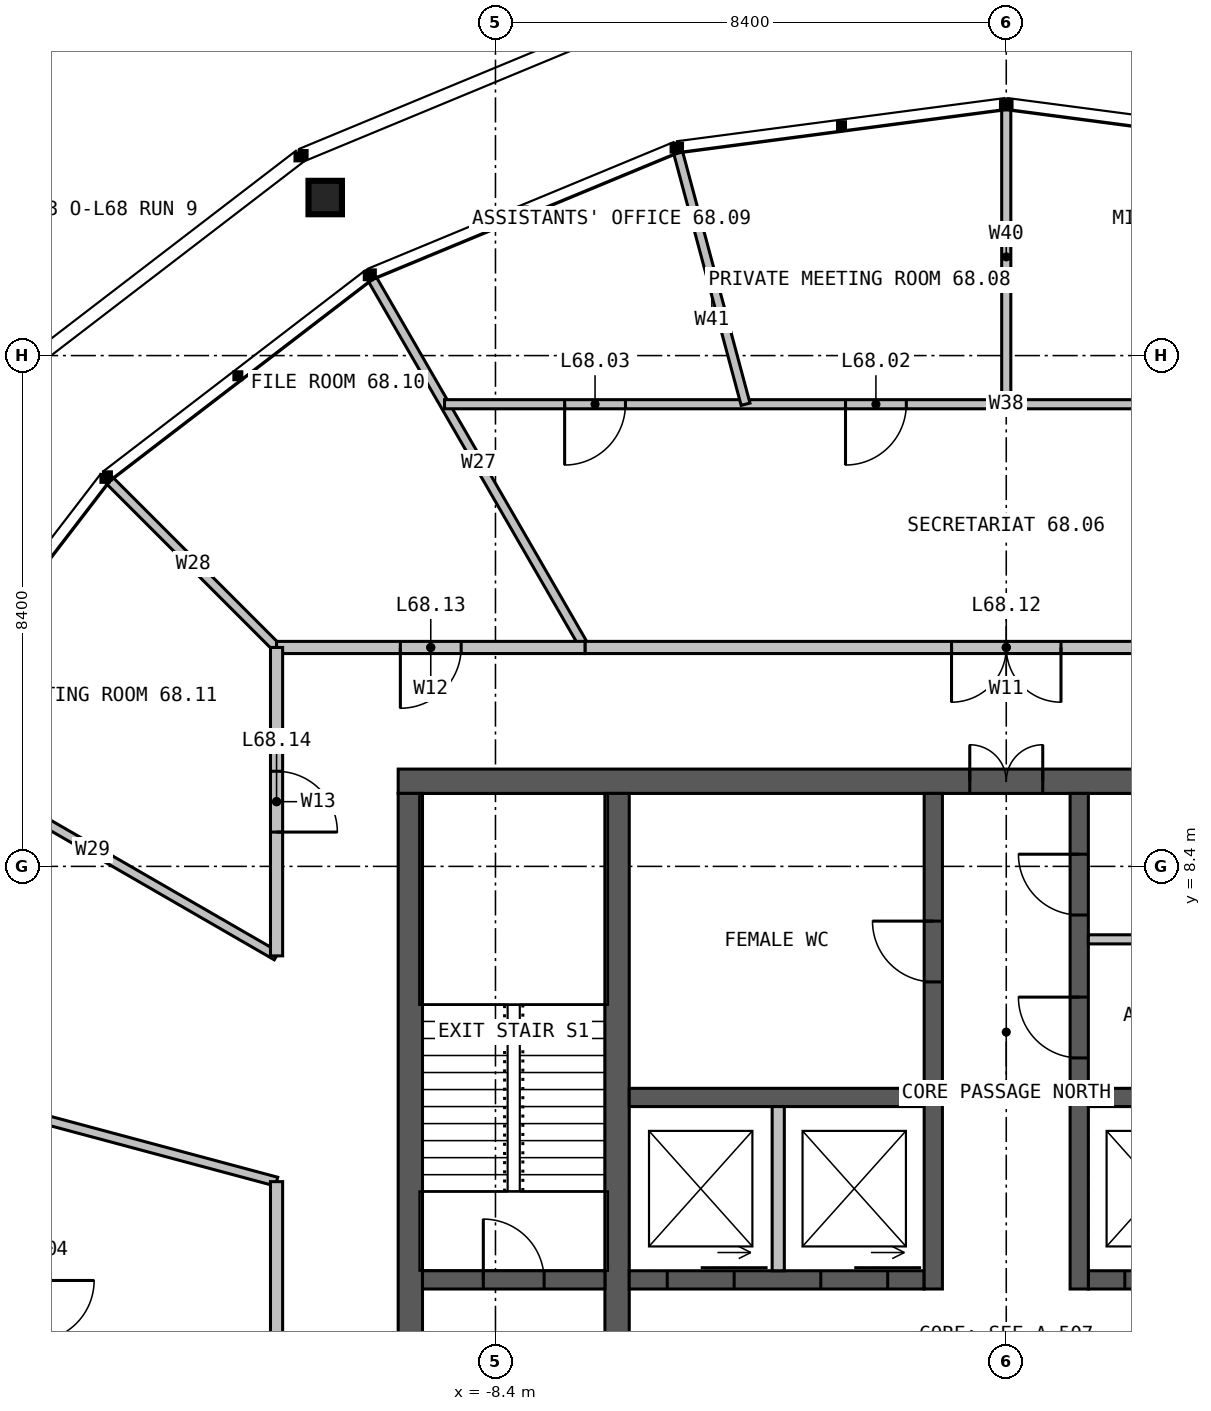
"""IFC4 building model, lengths in metres.
Left out: names, types, materials, properties, quantities, classifications, styles, units other than length and angle.
Written with IfcOpenShell. Run it as: python <this file> out.ifc"""

import sys

from ifc_helpers import new_model, si_unit, direction, frame, frame_2d, origin, origin_2d, place, context, subcontext, project, spatial, rectangle, hollow_rectangle, extrude, element, fill, save


model = new_model("IFC4")
c1 = context("Model", 3, precision=1e-05, world=origin(), true_north=direction((0.0, 1.0)))
c2 = subcontext(c1, "Body", "Model", "MODEL_VIEW")
j1 = project(units=[si_unit("LENGTHUNIT", "METRE"), si_unit("PLANEANGLEUNIT", "RADIAN")], contexts=[c1])
p1 = place(None, origin())
s1 = spatial("IfcSite", under=j1, at=p1, CompositionType="ELEMENT")
p2 = place(p1, origin())
s2 = spatial("IfcBuilding", under=s1, at=p2, CompositionType="ELEMENT")
p3 = place(p2, frame((0.0, 0.0, 280.0)))
s3 = spatial("IfcBuildingStorey", under=s2, at=p3, CompositionType="ELEMENT", Elevation=280.0)
p4 = place(p3, frame((-10.0, 9.8, 0.0), z_axis=(0.0, 0.0, 1.0), x_axis=(1.0, 0.0, 0.0)))
e1 = element("IfcWall", 1, at=p4, inside=s3, PredefinedType="SOLIDWALL", context=c2, shape_type="SweptSolid", body=[
    extrude(rectangle(XDim=20.0, YDim=0.4, at=frame_2d((10.0, 0.0))), origin(), (0.0, 0.0, 1.0), 4.0),
])
p5 = place(p4, frame((9.4, 0.0, 0.0)))
e2 = element("IfcOpeningElement", 2, at=p5, cuts=e1, PredefinedType="OPENING", context=c2, shape_type="SweptSolid", body=[
    extrude(rectangle(XDim=1.2, YDim=2.2, at=frame_2d((0.6, 1.1))), frame((0.0, 0.21, 0.0), z_axis=(0.0, -1.0, 0.0), x_axis=(1.0, 0.0, 0.0)), (0.0, 0.0, 1.0), 0.42),
])
p6 = place(p3, frame((-9.8, 9.6, 0.0), z_axis=(0.0, 0.0, 1.0), x_axis=(0.0, -1.0, 0.0)))
e3 = element("IfcWall", 3, at=p6, inside=s3, PredefinedType="SOLIDWALL", context=c2, shape_type="SweptSolid", body=[
    extrude(rectangle(XDim=19.2, YDim=0.4, at=frame_2d((9.6, 0.0))), origin(), (0.0, 0.0, 1.0), 4.0),
])
p7 = place(p3, frame((-6.4, -9.6, 0.0), z_axis=(0.0, 0.0, 1.0), x_axis=(0.0, 1.0, 0.0)))
e4 = element("IfcWall", 4, at=p7, inside=s3, PredefinedType="SOLIDWALL", context=c2, shape_type="SweptSolid", body=[
    extrude(rectangle(XDim=19.2, YDim=0.4, at=frame_2d((9.6, 0.0))), origin(), (0.0, 0.0, 1.0), 4.0),
])
p8 = place(p7, frame((9.1, 0.0, 0.0)))
e5 = element("IfcOpeningElement", 5, at=p8, cuts=e4, PredefinedType="OPENING", context=c2, shape_type="SweptSolid", body=[
    extrude(rectangle(XDim=1.0, YDim=2.2, at=frame_2d((0.5, 1.1))), frame((0.0, 0.21, 0.0), z_axis=(0.0, -1.0, 0.0), x_axis=(1.0, 0.0, 0.0)), (0.0, 0.0, 1.0), 0.42),
])
p9 = place(p3, frame((-6.2, 1.6, 0.0), z_axis=(0.0, 0.0, 1.0), x_axis=(1.0, 0.0, 0.0)))
e6 = element("IfcWall", 6, at=p9, inside=s3, PredefinedType="SOLIDWALL", context=c2, shape_type="SweptSolid", body=[
    extrude(rectangle(XDim=4.85, YDim=0.3, at=frame_2d((2.425, 0.0))), origin(), (0.0, 0.0, 1.0), 4.0),
])
p10 = place(p9, frame((0.625, 0.0, 0.0)))
e7 = element("IfcOpeningElement", 7, at=p10, cuts=e6, PredefinedType="OPENING", context=c2, shape_type="SweptSolid", body=[
    extrude(rectangle(XDim=1.1, YDim=2.2, at=frame_2d((0.55, 1.1))), frame((0.0, 0.16, 0.0), z_axis=(0.0, -1.0, 0.0), x_axis=(1.0, 0.0, 0.0)), (0.0, 0.0, 1.0), 0.32),
])
p11 = place(p9, frame((3.15, 0.0, 0.0)))
e8 = element("IfcOpeningElement", 8, at=p11, cuts=e6, PredefinedType="OPENING", context=c2, shape_type="SweptSolid", body=[
    extrude(rectangle(XDim=1.1, YDim=2.2, at=frame_2d((0.55, 1.1))), frame((0.0, 0.16, 0.0), z_axis=(0.0, -1.0, 0.0), x_axis=(1.0, 0.0, 0.0)), (0.0, 0.0, 1.0), 0.32),
])
p12 = place(p3, frame((1.35, 1.6, 0.0), z_axis=(0.0, 0.0, 1.0), x_axis=(1.0, 0.0, 0.0)))
e9 = element("IfcWall", 9, at=p12, inside=s3, PredefinedType="SOLIDWALL", context=c2, shape_type="SweptSolid", body=[
    extrude(rectangle(XDim=4.85, YDim=0.3, at=frame_2d((2.425, 0.0))), origin(), (0.0, 0.0, 1.0), 4.0),
])
p13 = place(p12, frame((0.6, 0.0, 0.0)))
e10 = element("IfcOpeningElement", 10, at=p13, cuts=e9, PredefinedType="OPENING", context=c2, shape_type="SweptSolid", body=[
    extrude(rectangle(XDim=1.1, YDim=2.2, at=frame_2d((0.55, 1.1))), frame((0.0, 0.16, 0.0), z_axis=(0.0, -1.0, 0.0), x_axis=(1.0, 0.0, 0.0)), (0.0, 0.0, 1.0), 0.32),
])
p14 = place(p12, frame((3.125, 0.0, 0.0)))
e11 = element("IfcOpeningElement", 11, at=p14, cuts=e9, PredefinedType="OPENING", context=c2, shape_type="SweptSolid", body=[
    extrude(rectangle(XDim=1.1, YDim=2.2, at=frame_2d((0.55, 1.1))), frame((0.0, 0.16, 0.0), z_axis=(0.0, -1.0, 0.0), x_axis=(1.0, 0.0, 0.0)), (0.0, 0.0, 1.0), 0.32),
])
for number, where, z_axis, x_axis in (
    (12, (-6.2, 4.6, 0.0), (0.0, 0.0, 1.0), (1.0, 0.0, 0.0)),
    (13, (1.35, 4.6, 0.0), (0.0, 0.0, 1.0), (1.0, 0.0, 0.0)),
):
    element("IfcWall", number, at=place(p3, frame(where, z_axis=z_axis, x_axis=x_axis)), inside=s3, PredefinedType="SOLIDWALL", context=c2, shape_type="SweptSolid", body=[
        extrude(rectangle(XDim=4.85, YDim=0.3, at=frame_2d((2.425, 0.0))), origin(), (0.0, 0.0, 1.0), 4.0),
    ])
p15 = place(p3, frame((-1.2, 1.45, 0.0), z_axis=(0.0, 0.0, 1.0), x_axis=(0.0, 1.0, 0.0)))
e14 = element("IfcWall", 14, at=p15, inside=s3, PredefinedType="SOLIDWALL", context=c2, shape_type="SweptSolid", body=[
    extrude(rectangle(XDim=8.15, YDim=0.3, at=frame_2d((4.075, 0.0))), origin(), (0.0, 0.0, 1.0), 4.0),
])
p16 = place(p15, frame((5.05, 0.0, 0.0)))
e15 = element("IfcOpeningElement", 15, at=p16, cuts=e14, PredefinedType="OPENING", context=c2, shape_type="SweptSolid", body=[
    extrude(rectangle(XDim=1.0, YDim=2.2, at=frame_2d((0.5, 1.1))), frame((0.0, 0.16, 0.0), z_axis=(0.0, -1.0, 0.0), x_axis=(1.0, 0.0, 0.0)), (0.0, 0.0, 1.0), 0.32),
])
p17 = place(p3, frame((1.2, 1.45, 0.0), z_axis=(0.0, 0.0, 1.0), x_axis=(0.0, 1.0, 0.0)))
e16 = element("IfcWall", 16, at=p17, inside=s3, PredefinedType="SOLIDWALL", context=c2, shape_type="SweptSolid", body=[
    extrude(rectangle(XDim=8.15, YDim=0.3, at=frame_2d((4.075, 0.0))), origin(), (0.0, 0.0, 1.0), 4.0),
])
p18 = place(p17, frame((3.8, 0.0, 0.0)))
e17 = element("IfcOpeningElement", 17, at=p18, cuts=e16, PredefinedType="OPENING", context=c2, shape_type="SweptSolid", body=[
    extrude(rectangle(XDim=1.0, YDim=2.2, at=frame_2d((0.5, 1.1))), frame((0.0, 0.16, 0.0), z_axis=(0.0, -1.0, 0.0), x_axis=(1.0, 0.0, 0.0)), (0.0, 0.0, 1.0), 0.32),
])
p19 = place(p17, frame((6.15, 0.0, 0.0)))
e18 = element("IfcOpeningElement", 18, at=p19, cuts=e16, PredefinedType="OPENING", context=c2, shape_type="SweptSolid", body=[
    extrude(rectangle(XDim=1.0, YDim=2.2, at=frame_2d((0.5, 1.1))), frame((0.0, 0.16, 0.0), z_axis=(0.0, -1.0, 0.0), x_axis=(1.0, 0.0, 0.0)), (0.0, 0.0, 1.0), 0.32),
])
p20 = place(p3, frame((-9.6, 1.6, 0.0), z_axis=(0.0, 0.0, 1.0), x_axis=(1.0, 0.0, 0.0)))
e19 = element("IfcWall", 19, at=p20, inside=s3, PredefinedType="SOLIDWALL", context=c2, shape_type="SweptSolid", body=[
    extrude(rectangle(XDim=3.0, YDim=0.3, at=frame_2d((1.5, 0.0))), origin(), (0.0, 0.0, 1.0), 4.0),
])
p21 = place(p20, frame((1.0, 0.0, 0.0)))
e20 = element("IfcOpeningElement", 20, at=p21, cuts=e19, PredefinedType="OPENING", context=c2, shape_type="SweptSolid", body=[
    extrude(rectangle(XDim=1.0, YDim=2.2, at=frame_2d((0.5, 1.1))), frame((0.0, 0.16, 0.0), z_axis=(0.0, -1.0, 0.0), x_axis=(1.0, 0.0, 0.0)), (0.0, 0.0, 1.0), 0.32),
])
p22 = place(p3, frame((-11.2, 19.399, -0.71), z_axis=(0.0, 0.0, 1.0), x_axis=(1.0, 0.0, 0.0)))
e21 = element("IfcColumn", 21, at=p22, inside=s3, PredefinedType="COLUMN", context=c2, shape_type="SweptSolid", body=[
    extrude(hollow_rectangle(XDim=0.55, YDim=0.55, WallThickness=0.04, at=origin_2d()), origin(), (0.0, 0.0, 1.0), 4.0),
])
p23 = place(p3, frame((-3.75, 1.75, 0.0), z_axis=(0.0, 0.0, 1.0), x_axis=(0.0, 1.0, 0.0)))
e22 = element("IfcWall", 22, at=p23, inside=s3, PredefinedType="SOLIDWALL", context=c2, shape_type="SweptSolid", body=[
    extrude(rectangle(XDim=2.7, YDim=0.2, at=frame_2d((1.35, 0.0))), origin(), (0.0, 0.0, 1.0), 3.75),
])
p24 = place(p3, frame((1.35, 7.2, 0.0), z_axis=(0.0, 0.0, 1.0), x_axis=(1.0, 0.0, 0.0)))
e23 = element("IfcWall", 23, at=p24, inside=s3, PredefinedType="PARTITIONING", context=c2, shape_type="SweptSolid", body=[
    extrude(rectangle(XDim=4.85, YDim=0.15, at=frame_2d((2.425, 0.0))), origin(), (0.0, 0.0, 1.0), 3.75),
])
p25 = place(p24, frame((3.45, 0.0, 0.0)))
e24 = element("IfcOpeningElement", 24, at=p25, cuts=e23, PredefinedType="OPENING", context=c2, shape_type="SweptSolid", body=[
    extrude(rectangle(XDim=0.9, YDim=2.2, at=frame_2d((0.45, 1.1))), frame((0.0, 0.085, 0.0), z_axis=(0.0, -1.0, 0.0), x_axis=(1.0, 0.0, 0.0)), (0.0, 0.0, 1.0), 0.17),
])
p26 = place(p3, frame((-6.928, 12.0, 0.0), z_axis=(0.0, 0.0, 1.0), x_axis=(-0.49998952364, 0.866031452229, 0.0)))
e25 = element("IfcWall", 25, at=p26, inside=s3, PredefinedType="PARTITIONING", context=c2, shape_type="SweptSolid", body=[
    extrude(rectangle(XDim=6.99, YDim=0.15, at=frame_2d((3.495, 0.0))), origin(), (0.0, 0.0, 1.0), 2.79),
])
p27 = place(p3, frame((-12.0, 12.0, 0.0), z_axis=(0.0, 0.0, 1.0), x_axis=(-0.707106781187, 0.707106781187, 0.0)))
e26 = element("IfcWall", 26, at=p27, inside=s3, PredefinedType="PARTITIONING", context=c2, shape_type="SweptSolid", body=[
    extrude(rectangle(XDim=3.876, YDim=0.15, at=frame_2d((1.938, 0.0))), origin(), (0.0, 0.0, 1.0), 2.7),
])
p28 = place(p3, frame((-12.0, 6.928, 0.0), z_axis=(0.0, 0.0, 1.0), x_axis=(-0.866031452229, 0.49998952364, 0.0)))
e27 = element("IfcWall", 27, at=p28, inside=s3, PredefinedType="PARTITIONING", context=c2, shape_type="SweptSolid", body=[
    extrude(rectangle(XDim=6.99, YDim=0.15, at=frame_2d((3.495, 0.0))), origin(), (0.0, 0.0, 1.0), 2.7),
])
p29 = place(p3, frame((-12.0, 3.215, 0.0), z_axis=(0.0, 0.0, 1.0), x_axis=(-0.96592152797, 0.258835086115, 0.0)))
e28 = element("IfcWall", 28, at=p29, inside=s3, PredefinedType="PARTITIONING", context=c2, shape_type="SweptSolid", body=[
    extrude(rectangle(XDim=8.423, YDim=0.15, at=frame_2d((4.211, 0.0))), origin(), (0.0, 0.0, 1.0), 2.7),
])
p30 = place(p3, frame((9.238, 16.0, 0.0), z_axis=(0.0, 0.0, 1.0), x_axis=(-1.0, 0.0, 0.0)))
e29 = element("IfcWall", 29, at=p30, inside=s3, PredefinedType="PARTITIONING", context=c2, shape_type="SweptSolid", body=[
    extrude(rectangle(XDim=18.475, YDim=0.15, at=frame_2d((9.238, 0.0))), origin(), (0.0, 0.0, 1.0), 2.79),
])
p31 = place(p30, frame((3.719, 0.0, 0.0)))
e30 = element("IfcOpeningElement", 30, at=p31, cuts=e29, PredefinedType="OPENING", context=c2, shape_type="SweptSolid", body=[
    extrude(rectangle(XDim=1.8, YDim=2.2, at=frame_2d((0.9, 1.1))), frame((0.0, 0.085, 0.0), z_axis=(0.0, -1.0, 0.0), x_axis=(1.0, 0.0, 0.0)), (0.0, 0.0, 1.0), 0.17),
])
p32 = place(p30, frame((10.881, 0.0, 0.0)))
e31 = element("IfcOpeningElement", 31, at=p32, cuts=e29, PredefinedType="OPENING", context=c2, shape_type="SweptSolid", body=[
    extrude(rectangle(XDim=1.0, YDim=2.2, at=frame_2d((0.5, 1.1))), frame((0.0, 0.085, 0.0), z_axis=(0.0, -1.0, 0.0), x_axis=(1.0, 0.0, 0.0)), (0.0, 0.0, 1.0), 0.17),
])
p33 = place(p30, frame((15.5, 0.0, 0.0)))
e32 = element("IfcOpeningElement", 32, at=p33, cuts=e29, PredefinedType="OPENING", context=c2, shape_type="SweptSolid", body=[
    extrude(rectangle(XDim=1.0, YDim=2.2, at=frame_2d((0.5, 1.1))), frame((0.0, 0.085, 0.0), z_axis=(0.0, -1.0, 0.0), x_axis=(1.0, 0.0, 0.0)), (0.0, 0.0, 1.0), 0.17),
])
p34 = place(p3, frame((0.0, 16.0, 0.0), z_axis=(0.0, 0.0, 1.0), x_axis=(0.0, 1.0, 0.0)))
e33 = element("IfcWall", 33, at=p34, inside=s3, PredefinedType="PARTITIONING", context=c2, shape_type="SweptSolid", body=[
    extrude(rectangle(XDim=4.846, YDim=0.15, at=frame_2d((2.423, 0.0))), origin(), (0.0, 0.0, 1.0), 2.79),
])
p35 = place(p3, frame((-4.287, 16.0, 0.0), z_axis=(0.0, 0.0, 1.0), x_axis=(-0.258854832266, 0.965916236437, 0.0)))
e34 = element("IfcWall", 34, at=p35, inside=s3, PredefinedType="PARTITIONING", context=c2, shape_type="SweptSolid", body=[
    extrude(rectangle(XDim=4.282, YDim=0.15, at=frame_2d((2.141, 0.0))), origin(), (0.0, 0.0, 1.0), 2.7),
])
p36 = place(p3, frame((6.928, 12.0, 0.0), z_axis=(0.0, 0.0, 1.0), x_axis=(-1.0, 0.0, 0.0)))
e35 = element("IfcWall", 35, at=p36, inside=s3, PredefinedType="PARTITIONING", context=c2, shape_type="SweptSolid", body=[
    extrude(rectangle(XDim=13.856, YDim=0.2, at=frame_2d((6.928, 0.0))), origin(), (0.0, 0.0, 1.0), 3.7),
])
p37 = place(p36, frame((6.028, 0.0, 0.0)))
e36 = element("IfcOpeningElement", 36, at=p37, cuts=e35, PredefinedType="OPENING", context=c2, shape_type="SweptSolid", body=[
    extrude(rectangle(XDim=1.8, YDim=2.2, at=frame_2d((0.9, 1.1))), frame((0.0, 0.11, 0.0), z_axis=(0.0, -1.0, 0.0), x_axis=(1.0, 0.0, 0.0)), (0.0, 0.0, 1.0), 0.22),
])
p38 = place(p3, frame((-6.928, 12.0, 0.0), z_axis=(0.0, 0.0, 1.0), x_axis=(-1.0, 0.0, 0.0)))
e37 = element("IfcWall", 37, at=p38, inside=s3, PredefinedType="PARTITIONING", context=c2, shape_type="SweptSolid", body=[
    extrude(rectangle(XDim=5.072, YDim=0.2, at=frame_2d((2.536, 0.0))), origin(), (0.0, 0.0, 1.0), 3.7),
])
p39 = place(p38, frame((2.036, 0.0, 0.0)))
e38 = element("IfcOpeningElement", 38, at=p39, cuts=e37, PredefinedType="OPENING", context=c2, shape_type="SweptSolid", body=[
    extrude(rectangle(XDim=1.0, YDim=2.2, at=frame_2d((0.5, 1.1))), frame((0.0, 0.11, 0.0), z_axis=(0.0, -1.0, 0.0), x_axis=(1.0, 0.0, 0.0)), (0.0, 0.0, 1.0), 0.22),
])
p40 = place(p3, frame((-12.0, 12.0, 0.0), z_axis=(0.0, 0.0, 1.0), x_axis=(0.0, -1.0, 0.0)))
e39 = element("IfcWall", 39, at=p40, inside=s3, PredefinedType="PARTITIONING", context=c2, shape_type="SweptSolid", body=[
    extrude(rectangle(XDim=5.072, YDim=0.2, at=frame_2d((2.536, 0.0))), origin(), (0.0, 0.0, 1.0), 3.7),
])
p41 = place(p40, frame((2.036, 0.0, 0.0)))
e40 = element("IfcOpeningElement", 40, at=p41, cuts=e39, PredefinedType="OPENING", context=c2, shape_type="SweptSolid", body=[
    extrude(rectangle(XDim=1.0, YDim=2.2, at=frame_2d((0.5, 1.1))), frame((0.0, 0.11, 0.0), z_axis=(0.0, -1.0, 0.0), x_axis=(1.0, 0.0, 0.0)), (0.0, 0.0, 1.0), 0.22),
])
p42 = place(p3, frame((-12.0, 3.215, 0.0), z_axis=(0.0, 0.0, 1.0), x_axis=(0.0, -1.0, 0.0)))
e41 = element("IfcWall", 41, at=p42, inside=s3, PredefinedType="PARTITIONING", context=c2, shape_type="SweptSolid", body=[
    extrude(rectangle(XDim=10.144, YDim=0.2, at=frame_2d((5.072, 0.0))), origin(), (0.0, 0.0, 1.0), 3.7),
])
p43 = place(p42, frame((4.172, 0.0, 0.0)))
e42 = element("IfcOpeningElement", 42, at=p43, cuts=e41, PredefinedType="OPENING", context=c2, shape_type="SweptSolid", body=[
    extrude(rectangle(XDim=1.8, YDim=2.2, at=frame_2d((0.9, 1.1))), frame((0.0, 0.11, 0.0), z_axis=(0.0, -1.0, 0.0), x_axis=(1.0, 0.0, 0.0)), (0.0, 0.0, 1.0), 0.22),
])
p44 = place(p5, origin())
e43 = element("IfcDoor", 43, at=p44, inside=s3, OperationType="DOUBLE_DOOR_SINGLE_SWING", PredefinedType="DOOR", context=c2, shape_type="SweptSolid", body=[
    extrude(rectangle(XDim=1.2, YDim=2.2, at=frame_2d((0.6, 1.1))), frame((0.0, 0.025, 0.0), z_axis=(0.0, -1.0, 0.0), x_axis=(1.0, 0.0, 0.0)), (0.0, 0.0, 1.0), 0.05),
])
fill(e2, e43)
p45 = place(p21, origin())
e44 = element("IfcDoor", 44, at=p45, inside=s3, OperationType="SINGLE_SWING_LEFT", PredefinedType="DOOR", context=c2, shape_type="SweptSolid", body=[
    extrude(rectangle(XDim=1.0, YDim=2.2, at=frame_2d((0.5, 1.1))), frame((0.0, 0.025, 0.0), z_axis=(0.0, -1.0, 0.0), x_axis=(1.0, 0.0, 0.0)), (0.0, 0.0, 1.0), 0.05),
])
fill(e20, e44)
p46 = place(p16, origin())
e45 = element("IfcDoor", 45, at=p46, inside=s3, OperationType="SINGLE_SWING_RIGHT", PredefinedType="DOOR", context=c2, shape_type="SweptSolid", body=[
    extrude(rectangle(XDim=1.0, YDim=2.2, at=frame_2d((0.5, 1.1))), frame((0.0, 0.025, 0.0), z_axis=(0.0, -1.0, 0.0), x_axis=(1.0, 0.0, 0.0)), (0.0, 0.0, 1.0), 0.05),
])
fill(e15, e45)
p47 = place(p18, origin())
e46 = element("IfcDoor", 46, at=p47, inside=s3, OperationType="SINGLE_SWING_RIGHT", PredefinedType="DOOR", context=c2, shape_type="SweptSolid", body=[
    extrude(rectangle(XDim=1.0, YDim=2.2, at=frame_2d((0.5, 1.1))), frame((0.0, 0.025, 0.0), z_axis=(0.0, -1.0, 0.0), x_axis=(1.0, 0.0, 0.0)), (0.0, 0.0, 1.0), 0.05),
])
fill(e17, e46)
p48 = place(p19, origin())
e47 = element("IfcDoor", 47, at=p48, inside=s3, OperationType="SINGLE_SWING_RIGHT", PredefinedType="DOOR", context=c2, shape_type="SweptSolid", body=[
    extrude(rectangle(XDim=1.0, YDim=2.2, at=frame_2d((0.5, 1.1))), frame((0.0, 0.025, 0.0), z_axis=(0.0, -1.0, 0.0), x_axis=(1.0, 0.0, 0.0)), (0.0, 0.0, 1.0), 0.05),
])
fill(e18, e47)
p49 = place(p10, origin())
e48 = element("IfcDoor", 48, at=p49, inside=s3, OperationType="SLIDING_TO_LEFT", PredefinedType="DOOR", context=c2, shape_type="SweptSolid", body=[
    extrude(rectangle(XDim=1.1, YDim=2.2, at=frame_2d((0.55, 1.1))), frame((0.0, 0.025, 0.0), z_axis=(0.0, -1.0, 0.0), x_axis=(1.0, 0.0, 0.0)), (0.0, 0.0, 1.0), 0.05),
])
fill(e7, e48)
p50 = place(p11, origin())
e49 = element("IfcDoor", 49, at=p50, inside=s3, OperationType="SLIDING_TO_LEFT", PredefinedType="DOOR", context=c2, shape_type="SweptSolid", body=[
    extrude(rectangle(XDim=1.1, YDim=2.2, at=frame_2d((0.55, 1.1))), frame((0.0, 0.025, 0.0), z_axis=(0.0, -1.0, 0.0), x_axis=(1.0, 0.0, 0.0)), (0.0, 0.0, 1.0), 0.05),
])
fill(e8, e49)
p51 = place(p13, origin())
e50 = element("IfcDoor", 50, at=p51, inside=s3, OperationType="SLIDING_TO_LEFT", PredefinedType="DOOR", context=c2, shape_type="SweptSolid", body=[
    extrude(rectangle(XDim=1.1, YDim=2.2, at=frame_2d((0.55, 1.1))), frame((0.0, 0.025, 0.0), z_axis=(0.0, -1.0, 0.0), x_axis=(1.0, 0.0, 0.0)), (0.0, 0.0, 1.0), 0.05),
])
fill(e10, e50)
p52 = place(p32, origin())
e51 = element("IfcDoor", 51, at=p52, inside=s3, OperationType="SINGLE_SWING_RIGHT", PredefinedType="DOOR", context=c2, shape_type="SweptSolid", body=[
    extrude(rectangle(XDim=1.0, YDim=2.2, at=frame_2d((0.5, 1.1))), frame((0.0, 0.025, 0.0), z_axis=(0.0, -1.0, 0.0), x_axis=(1.0, 0.0, 0.0)), (0.0, 0.0, 1.0), 0.05),
])
fill(e31, e51)
p53 = place(p33, origin())
e52 = element("IfcDoor", 52, at=p53, inside=s3, OperationType="SINGLE_SWING_RIGHT", PredefinedType="DOOR", context=c2, shape_type="SweptSolid", body=[
    extrude(rectangle(XDim=1.0, YDim=2.2, at=frame_2d((0.5, 1.1))), frame((0.0, 0.025, 0.0), z_axis=(0.0, -1.0, 0.0), x_axis=(1.0, 0.0, 0.0)), (0.0, 0.0, 1.0), 0.05),
])
fill(e32, e52)
p54 = place(p37, origin())
e53 = element("IfcDoor", 53, at=p54, inside=s3, OperationType="DOUBLE_DOOR_SINGLE_SWING", PredefinedType="DOOR", context=c2, shape_type="SweptSolid", body=[
    extrude(rectangle(XDim=1.8, YDim=2.2, at=frame_2d((0.9, 1.1))), frame((0.0, 0.025, 0.0), z_axis=(0.0, -1.0, 0.0), x_axis=(1.0, 0.0, 0.0)), (0.0, 0.0, 1.0), 0.05),
])
fill(e36, e53)
p55 = place(p39, origin())
e54 = element("IfcDoor", 54, at=p55, inside=s3, OperationType="SINGLE_SWING_RIGHT", PredefinedType="DOOR", context=c2, shape_type="SweptSolid", body=[
    extrude(rectangle(XDim=1.0, YDim=2.2, at=frame_2d((0.5, 1.1))), frame((0.0, 0.025, 0.0), z_axis=(0.0, -1.0, 0.0), x_axis=(1.0, 0.0, 0.0)), (0.0, 0.0, 1.0), 0.05),
])
fill(e38, e54)
p56 = place(p41, origin())
e55 = element("IfcDoor", 55, at=p56, inside=s3, OperationType="SINGLE_SWING_RIGHT", PredefinedType="DOOR", context=c2, shape_type="SweptSolid", body=[
    extrude(rectangle(XDim=1.0, YDim=2.2, at=frame_2d((0.5, 1.1))), frame((0.0, 0.025, 0.0), z_axis=(0.0, -1.0, 0.0), x_axis=(1.0, 0.0, 0.0)), (0.0, 0.0, 1.0), 0.05),
])
fill(e40, e55)
save(model, sys.argv[1])
